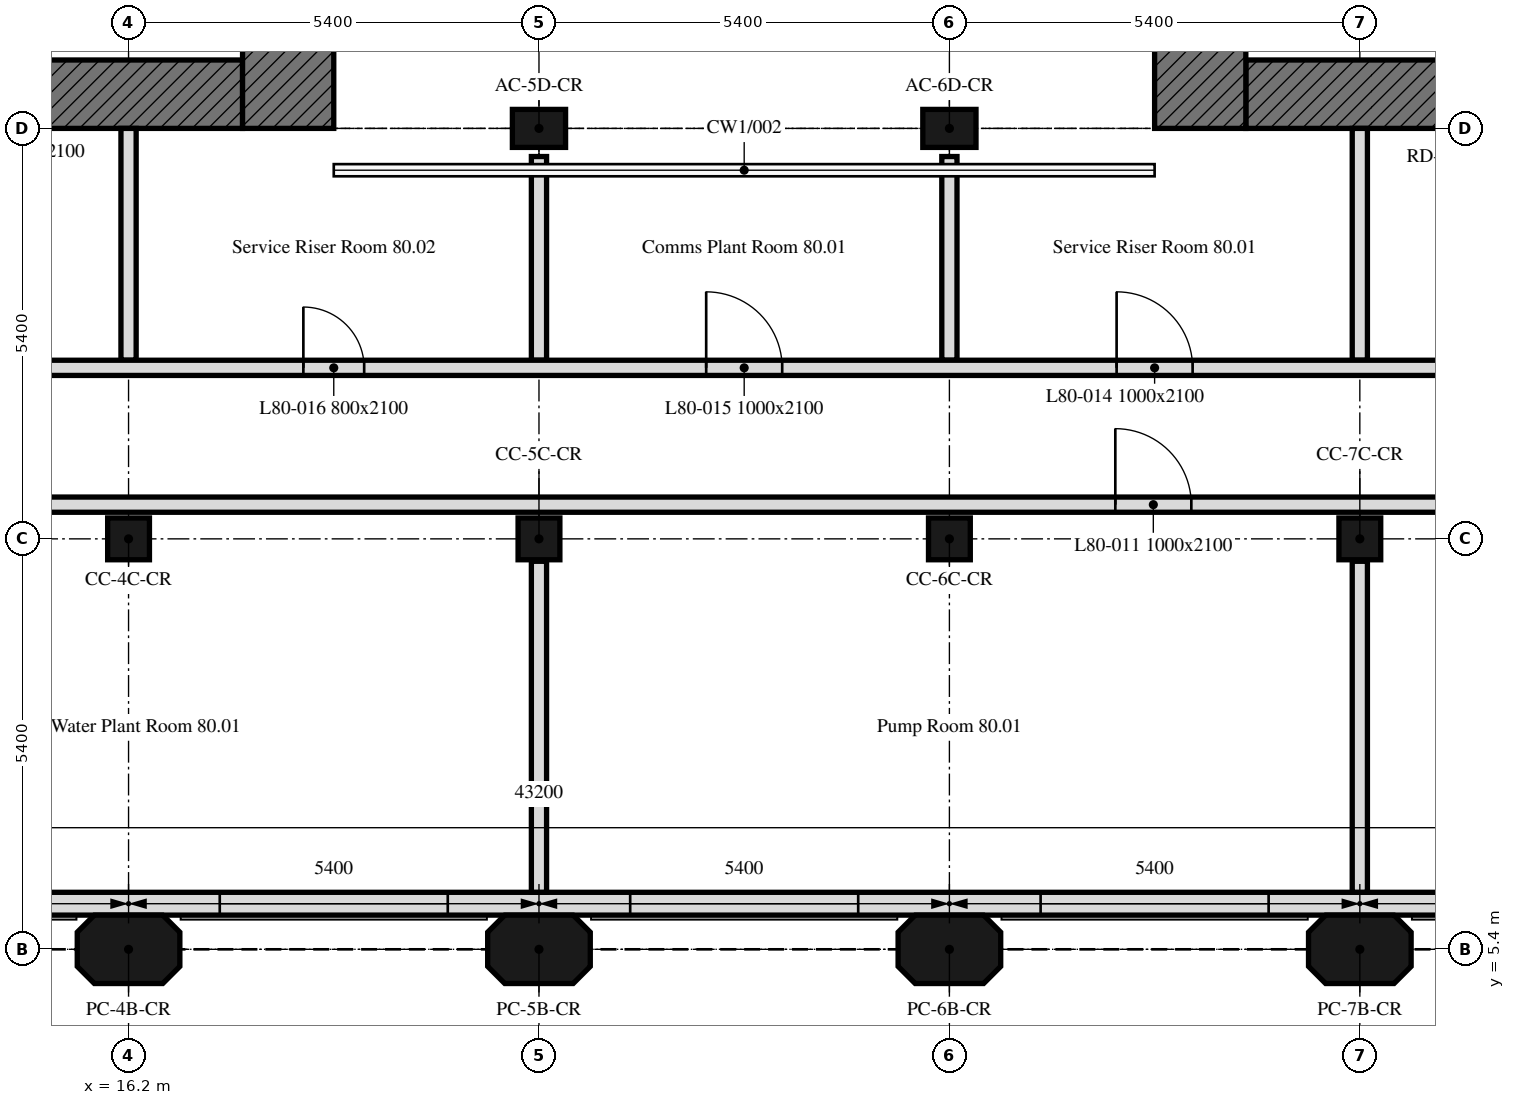
"""IFC4 building model, lengths in metres.
Left out: names, types, materials, properties, quantities, classifications, styles, units other than length and angle.
Written with IfcOpenShell. Run it as: python <this file> out.ifc"""

import sys

from ifc_helpers import new_model, si_unit, direction, frame, frame_2d, origin, origin_2d, place, context, subcontext, project, spatial, polyline, rectangle, outline, extrude, element, fill, save


model = new_model("IFC4")
c1 = context("Model", 3, precision=1e-05, world=origin(), true_north=direction((0.0, 1.0)))
c2 = subcontext(c1, "Body", "Model", "MODEL_VIEW")
j1 = project(units=[si_unit("LENGTHUNIT", "METRE"), si_unit("PLANEANGLEUNIT", "RADIAN")], contexts=[c1])
p1 = place(None, origin())
s1 = spatial("IfcSite", under=j1, at=p1, CompositionType="ELEMENT")
p2 = place(p1, origin())
s2 = spatial("IfcBuilding", under=s1, at=p2, CompositionType="ELEMENT")
p3 = place(p2, frame((0.0, 0.0, 321.7)))
s3 = spatial("IfcBuildingStorey", under=s2, at=p3, CompositionType="ELEMENT", Elevation=321.7)
for number, where, z_axis, x_axis in (
    (1, (16.2, 5.4, 0.0), (0.0, 0.0, 1.0), (1.0, 0.0, 0.0)),
    (2, (21.6, 5.4, 0.0), (0.0, 0.0, 1.0), (1.0, 0.0, 0.0)),
    (3, (27.0, 5.4, 0.0), (0.0, 0.0, 1.0), (1.0, 0.0, 0.0)),
    (4, (32.4, 5.4, 0.0), (0.0, 0.0, 1.0), (1.0, 0.0, 0.0)),
):
    element("IfcColumn", number, at=place(p3, frame(where, z_axis=z_axis, x_axis=x_axis)), inside=s3, PredefinedType="COLUMN", context=c2, shape_type="SweptSolid", body=[
        extrude(outline(polyline([(-0.45, -0.45), (0.45, -0.45), (0.675, -0.225), (0.675, 0.225), (0.45, 0.45), (-0.45, 0.45), (-0.675, 0.225), (-0.675, -0.225), (-0.45, -0.45)])), origin(), (0.0, 0.0, 1.0), 4.2),
    ])
for number, where, z_axis, x_axis in (
    (5, (16.2, 10.8, 0.0), (0.0, 0.0, 1.0), (1.0, 0.0, 0.0)),
    (6, (21.6, 10.8, 0.0), (0.0, 0.0, 1.0), (1.0, 0.0, 0.0)),
    (7, (27.0, 10.8, 0.0), (0.0, 0.0, 1.0), (1.0, 0.0, 0.0)),
    (8, (32.4, 10.8, 0.0), (0.0, 0.0, 1.0), (1.0, 0.0, 0.0)),
):
    element("IfcColumn", number, at=place(p3, frame(where, z_axis=z_axis, x_axis=x_axis)), inside=s3, PredefinedType="COLUMN", context=c2, shape_type="SweptSolid", body=[
        extrude(rectangle(XDim=0.55, YDim=0.55, at=origin_2d()), origin(), (0.0, 0.0, 1.0), 4.2),
    ])
for number, where, z_axis, x_axis in (
    (9, (21.6, 16.2, 0.0), (0.0, 0.0, 1.0), (1.0, 0.0, 0.0)),
    (10, (27.0, 16.2, 0.0), (0.0, 0.0, 1.0), (1.0, 0.0, 0.0)),
):
    element("IfcColumn", number, at=place(p3, frame(where, z_axis=z_axis, x_axis=x_axis)), inside=s3, PredefinedType="COLUMN", context=c2, shape_type="SweptSolid", body=[
        extrude(rectangle(XDim=0.7, YDim=0.5, at=origin_2d()), origin(), (0.0, 0.0, 1.0), 4.2),
    ])
p4 = place(p3, frame((9.45, 6.0, 0.0), z_axis=(0.0, 0.0, 1.0), x_axis=(1.0, 0.0, 0.0)))
e11 = element("IfcWall", 11, at=p4, inside=s3, PredefinedType="SOLIDWALL", context=c2, shape_type="SweptSolid", body=[
    extrude(outline(polyline([(0.0, 0.0), (28.164, 0.0), (28.164, 4.2), (27.564, 4.2), (26.965, 4.2), (26.366, 4.2), (25.767, 4.2), (25.167, 4.2), (24.568, 4.2), (23.969, 4.2), (23.37, 4.2), (22.771, 4.2), (22.171, 4.2), (21.572, 4.2), (20.973, 4.2), (20.374, 4.2), (19.774, 4.2), (19.175, 4.2), (18.576, 4.2), (17.977, 4.2), (17.377, 4.2), (16.778, 4.2), (16.179, 4.2), (15.58, 4.2), (14.981, 4.2), (14.381, 4.2), (13.782, 4.2), (13.183, 4.2), (12.584, 4.2), (11.985, 4.2), (11.385, 4.2), (10.786, 4.2), (10.187, 4.2), (9.588, 4.2), (8.988, 4.2), (8.389, 4.2), (7.79, 4.2), (7.191, 4.2), (6.592, 4.2), (5.992, 4.2), (5.393, 4.2), (4.794, 4.2), (4.195, 4.2), (3.595, 4.2), (2.996, 4.2), (2.397, 4.2), (1.798, 4.2), (1.198, 4.2), (0.599, 4.2), (0.0, 4.2), (0.0, 0.0)])), frame((0.0, 0.15, 0.0), z_axis=(0.0, -1.0, 0.0), x_axis=(1.0, 0.0, 0.0)), (0.0, 0.0, 1.0), 0.3),
])
p5 = place(p4, frame((2.55, 0.0, 0.6)))
e12 = element("IfcOpeningElement", 12, at=p5, cuts=e11, PredefinedType="OPENING", context=c2, shape_type="SweptSolid", body=[
    extrude(rectangle(XDim=3.0, YDim=1.8, at=frame_2d((1.5, 0.9))), frame((0.0, 0.16, 0.0), z_axis=(0.0, -1.0, 0.0), x_axis=(1.0, 0.0, 0.0)), (0.0, 0.0, 1.0), 0.32),
])
p6 = place(p4, frame((7.95, 0.0, 0.6)))
e13 = element("IfcOpeningElement", 13, at=p6, cuts=e11, PredefinedType="OPENING", context=c2, shape_type="SweptSolid", body=[
    extrude(rectangle(XDim=3.0, YDim=1.8, at=frame_2d((1.5, 0.9))), frame((0.0, 0.16, 0.0), z_axis=(0.0, -1.0, 0.0), x_axis=(1.0, 0.0, 0.0)), (0.0, 0.0, 1.0), 0.32),
])
p7 = place(p4, frame((13.35, 0.0, 0.6)))
e14 = element("IfcOpeningElement", 14, at=p7, cuts=e11, PredefinedType="OPENING", context=c2, shape_type="SweptSolid", body=[
    extrude(rectangle(XDim=3.0, YDim=1.8, at=frame_2d((1.5, 0.9))), frame((0.0, 0.16, 0.0), z_axis=(0.0, -1.0, 0.0), x_axis=(1.0, 0.0, 0.0)), (0.0, 0.0, 1.0), 0.32),
])
p8 = place(p4, frame((18.75, 0.0, 0.6)))
e15 = element("IfcOpeningElement", 15, at=p8, cuts=e11, PredefinedType="OPENING", context=c2, shape_type="SweptSolid", body=[
    extrude(rectangle(XDim=3.0, YDim=1.8, at=frame_2d((1.5, 0.9))), frame((0.0, 0.16, 0.0), z_axis=(0.0, -1.0, 0.0), x_axis=(1.0, 0.0, 0.0)), (0.0, 0.0, 1.0), 0.32),
])
p9 = place(p4, frame((24.15, 0.0, 0.6)))
e16 = element("IfcOpeningElement", 16, at=p9, cuts=e11, PredefinedType="OPENING", context=c2, shape_type="SweptSolid", body=[
    extrude(rectangle(XDim=3.0, YDim=1.8, at=frame_2d((1.5, 0.9))), frame((0.0, 0.16, 0.0), z_axis=(0.0, -1.0, 0.0), x_axis=(1.0, 0.0, 0.0)), (0.0, 0.0, 1.0), 0.32),
])
p10 = place(p3, frame((17.7, 16.65, 0.0), z_axis=(0.0, 0.0, 1.0), x_axis=(-1.0, 0.0, 0.0)))
e17 = element("IfcWall", 17, at=p10, inside=s3, PredefinedType="SOLIDWALL", context=c2, shape_type="SweptSolid", body=[
    extrude(outline(polyline([(0.0, 0.0), (11.1, 0.0), (11.1, 5.933), (0.0, 4.2), (0.0, 0.0)])), frame((0.0, 0.45, 0.0), z_axis=(0.0, -1.0, 0.0), x_axis=(1.0, 0.0, 0.0)), (0.0, 0.0, 1.0), 0.9),
])
p11 = place(p10, frame((5.55, 0.0, 0.0)))
e18 = element("IfcOpeningElement", 18, at=p11, cuts=e17, PredefinedType="OPENING", context=c2, shape_type="SweptSolid", body=[
    extrude(rectangle(XDim=2.0, YDim=2.4, at=frame_2d((1.0, 1.2))), frame((0.0, 0.45, 0.0), z_axis=(0.0, -1.0, 0.0), x_axis=(1.0, 0.0, 0.0)), (0.0, 0.0, 1.0), 0.9),
])
p12 = place(p3, frame((18.3, 32.4, 0.0), z_axis=(0.0, 0.0, 1.0), x_axis=(0.0, -1.0, 0.0)))
e19 = element("IfcWall", 19, at=p12, inside=s3, PredefinedType="SOLIDWALL", context=c2, shape_type="SweptSolid", body=[
    extrude(rectangle(XDim=16.2, YDim=1.2, at=frame_2d((8.1, 0.0))), origin(), (0.0, 0.0, 1.0), 4.2),
])
p13 = place(p3, frame((42.0, 16.65, 0.0), z_axis=(0.0, 0.0, 1.0), x_axis=(-1.0, 0.0, 0.0)))
e20 = element("IfcWall", 20, at=p13, inside=s3, PredefinedType="SOLIDWALL", context=c2, shape_type="SweptSolid", body=[
    extrude(rectangle(XDim=11.1, YDim=0.9, at=frame_2d((5.55, 0.0))), origin(), (0.0, 0.0, 1.0), 4.2),
])
p14 = place(p13, frame((3.55, 0.0, 0.0)))
e21 = element("IfcOpeningElement", 21, at=p14, cuts=e20, PredefinedType="OPENING", context=c2, shape_type="SweptSolid", body=[
    extrude(rectangle(XDim=2.0, YDim=2.4, at=frame_2d((1.0, 1.2))), frame((0.0, 0.45, 0.0), z_axis=(0.0, -1.0, 0.0), x_axis=(1.0, 0.0, 0.0)), (0.0, 0.0, 1.0), 0.9),
])
p15 = place(p3, frame((30.3, 16.2, 0.0), z_axis=(0.0, 0.0, 1.0), x_axis=(0.0, 1.0, 0.0)))
e22 = element("IfcWall", 22, at=p15, inside=s3, PredefinedType="SOLIDWALL", context=c2, shape_type="SweptSolid", body=[
    extrude(rectangle(XDim=16.2, YDim=1.2, at=frame_2d((8.1, 0.0))), origin(), (0.0, 0.0, 1.0), 4.2),
])
for number, where, z_axis, x_axis in (
    (23, (32.4, 10.505, 0.0), (0.0, 0.0, 1.0), (0.0, -1.0, 0.0)),
    (24, (21.6, 10.505, 0.0), (0.0, 0.0, 1.0), (0.0, -1.0, 0.0)),
):
    element("IfcWall", number, at=place(p3, frame(where, z_axis=z_axis, x_axis=x_axis)), inside=s3, PredefinedType="PARTITIONING", context=c2, shape_type="SweptSolid", body=[
        extrude(rectangle(XDim=4.354, YDim=0.2, at=frame_2d((2.177, 0.0))), origin(), (0.0, 0.0, 1.0), 4.2),
    ])
p16 = place(p3, frame((9.45, 11.25, 0.0), z_axis=(0.0, 0.0, 1.0), x_axis=(1.0, 0.0, 0.0)))
e25 = element("IfcWall", 25, at=p16, inside=s3, PredefinedType="PARTITIONING", context=c2, shape_type="SweptSolid", body=[
    extrude(rectangle(XDim=32.999, YDim=0.2, at=frame_2d((16.5, 0.0))), origin(), (0.0, 0.0, 1.0), 4.2),
])
p17 = place(p16, frame((25.167, 0.0, 0.0)))
e26 = element("IfcOpeningElement", 26, at=p17, cuts=e25, PredefinedType="OPENING", context=c2, shape_type="SweptSolid", body=[
    extrude(rectangle(XDim=1.0, YDim=2.1, at=frame_2d((0.5, 1.05))), frame((0.0, 0.1, 0.0), z_axis=(0.0, -1.0, 0.0), x_axis=(1.0, 0.0, 0.0)), (0.0, 0.0, 1.0), 0.2),
])
p18 = place(p16, frame((19.733, 0.0, 0.0)))
e27 = element("IfcOpeningElement", 27, at=p18, cuts=e25, PredefinedType="OPENING", context=c2, shape_type="SweptSolid", body=[
    extrude(rectangle(XDim=1.0, YDim=2.1, at=frame_2d((0.5, 1.05))), frame((0.0, 0.1, 0.0), z_axis=(0.0, -1.0, 0.0), x_axis=(1.0, 0.0, 0.0)), (0.0, 0.0, 1.0), 0.2),
])
p19 = place(p16, frame((3.567, 0.0, 0.0)))
e28 = element("IfcOpeningElement", 28, at=p19, cuts=e25, PredefinedType="OPENING", context=c2, shape_type="SweptSolid", body=[
    extrude(rectangle(XDim=1.0, YDim=2.1, at=frame_2d((0.5, 1.05))), frame((0.0, 0.1, 0.0), z_axis=(0.0, -1.0, 0.0), x_axis=(1.0, 0.0, 0.0)), (0.0, 0.0, 1.0), 0.2),
])
p20 = place(p3, frame((27.0, 15.83, 0.0), z_axis=(0.0, 0.0, 1.0), x_axis=(0.0, -1.0, 0.0)))
e29 = element("IfcWall", 29, at=p20, inside=s3, PredefinedType="PARTITIONING", context=c2, shape_type="SweptSolid", body=[
    extrude(rectangle(XDim=2.68, YDim=0.2, at=frame_2d((1.34, 0.0))), origin(), (0.0, 0.0, 1.0), 4.2),
])
p21 = place(p3, frame((32.4, 13.15, 0.0), z_axis=(0.0, 0.0, 1.0), x_axis=(0.0, 1.0, 0.0)))
e30 = element("IfcWall", 30, at=p21, inside=s3, PredefinedType="PARTITIONING", context=c2, shape_type="SweptSolid", body=[
    extrude(rectangle(XDim=3.05, YDim=0.2, at=frame_2d((1.525, 0.0))), origin(), (0.0, 0.0, 1.0), 4.2),
])
p22 = place(p3, frame((21.6, 15.83, 0.0), z_axis=(0.0, 0.0, 1.0), x_axis=(0.0, -1.0, 0.0)))
e31 = element("IfcWall", 31, at=p22, inside=s3, PredefinedType="PARTITIONING", context=c2, shape_type="SweptSolid", body=[
    extrude(rectangle(XDim=2.68, YDim=0.2, at=frame_2d((1.34, 0.0))), origin(), (0.0, 0.0, 1.0), 4.2),
])
p23 = place(p3, frame((16.2, 16.2, 0.0), z_axis=(0.0, 0.0, 1.0), x_axis=(0.0, -1.0, 0.0)))
e32 = element("IfcWall", 32, at=p23, inside=s3, PredefinedType="PARTITIONING", context=c2, shape_type="SweptSolid", body=[
    extrude(rectangle(XDim=3.05, YDim=0.2, at=frame_2d((1.525, 0.0))), origin(), (0.0, 0.0, 1.0), 4.2),
])
p24 = place(p3, frame((9.45, 13.05, 0.0), z_axis=(0.0, 0.0, 1.0), x_axis=(1.0, 0.0, 0.0)))
e33 = element("IfcWall", 33, at=p24, inside=s3, PredefinedType="PARTITIONING", context=c2, shape_type="SweptSolid", body=[
    extrude(rectangle(XDim=31.899, YDim=0.2, at=frame_2d((15.95, 0.0))), origin(), (0.0, 0.0, 1.0), 4.2),
])
p25 = place(p24, frame((19.75, 0.0, 0.0)))
e34 = element("IfcOpeningElement", 34, at=p25, cuts=e33, PredefinedType="OPENING", context=c2, shape_type="SweptSolid", body=[
    extrude(rectangle(XDim=1.0, YDim=2.1, at=frame_2d((0.5, 1.05))), frame((0.0, 0.1, 0.0), z_axis=(0.0, -1.0, 0.0), x_axis=(1.0, 0.0, 0.0)), (0.0, 0.0, 1.0), 0.2),
])
p26 = place(p24, frame((14.35, 0.0, 0.0)))
e35 = element("IfcOpeningElement", 35, at=p26, cuts=e33, PredefinedType="OPENING", context=c2, shape_type="SweptSolid", body=[
    extrude(rectangle(XDim=1.0, YDim=2.1, at=frame_2d((0.5, 1.05))), frame((0.0, 0.1, 0.0), z_axis=(0.0, -1.0, 0.0), x_axis=(1.0, 0.0, 0.0)), (0.0, 0.0, 1.0), 0.2),
])
p27 = place(p24, frame((9.05, 0.0, 0.0)))
e36 = element("IfcOpeningElement", 36, at=p27, cuts=e33, PredefinedType="OPENING", context=c2, shape_type="SweptSolid", body=[
    extrude(rectangle(XDim=0.8, YDim=2.1, at=frame_2d((0.4, 1.05))), frame((0.0, 0.1, 0.0), z_axis=(0.0, -1.0, 0.0), x_axis=(1.0, 0.0, 0.0)), (0.0, 0.0, 1.0), 0.2),
])
p28 = place(p24, frame((25.35, 0.0, 0.0)))
e37 = element("IfcOpeningElement", 37, at=p28, cuts=e33, PredefinedType="OPENING", context=c2, shape_type="SweptSolid", body=[
    extrude(rectangle(XDim=1.8, YDim=2.4, at=frame_2d((0.9, 1.2))), frame((0.0, 0.1, 0.0), z_axis=(0.0, -1.0, 0.0), x_axis=(1.0, 0.0, 0.0)), (0.0, 0.0, 1.0), 0.2),
])
p29 = place(p6, origin())
e38 = element("IfcWindow", 38, at=p29, inside=s3, PartitioningType="SINGLE_PANEL", PredefinedType="WINDOW", context=c2, shape_type="SweptSolid", body=[
    extrude(rectangle(XDim=3.0, YDim=1.8, at=frame_2d((1.5, 0.9))), frame((0.0, 0.03, 0.0), z_axis=(0.0, -1.0, 0.0), x_axis=(1.0, 0.0, 0.0)), (0.0, 0.0, 1.0), 0.06),
])
fill(e13, e38)
p30 = place(p7, origin())
e39 = element("IfcWindow", 39, at=p30, inside=s3, PartitioningType="SINGLE_PANEL", PredefinedType="WINDOW", context=c2, shape_type="SweptSolid", body=[
    extrude(rectangle(XDim=3.0, YDim=1.8, at=frame_2d((1.5, 0.9))), frame((0.0, 0.03, 0.0), z_axis=(0.0, -1.0, 0.0), x_axis=(1.0, 0.0, 0.0)), (0.0, 0.0, 1.0), 0.06),
])
fill(e14, e39)
p31 = place(p8, origin())
e40 = element("IfcWindow", 40, at=p31, inside=s3, PartitioningType="SINGLE_PANEL", PredefinedType="WINDOW", context=c2, shape_type="SweptSolid", body=[
    extrude(rectangle(XDim=3.0, YDim=1.8, at=frame_2d((1.5, 0.9))), frame((0.0, 0.03, 0.0), z_axis=(0.0, -1.0, 0.0), x_axis=(1.0, 0.0, 0.0)), (0.0, 0.0, 1.0), 0.06),
])
fill(e15, e40)
p32 = place(p18, origin())
e41 = element("IfcDoor", 41, at=p32, inside=s3, OperationType="SINGLE_SWING_LEFT", PredefinedType="DOOR", context=c2, shape_type="SweptSolid", body=[
    extrude(rectangle(XDim=1.0, YDim=2.1, at=frame_2d((0.5, 1.05))), frame((0.0, 0.025, 0.0), z_axis=(0.0, -1.0, 0.0), x_axis=(1.0, 0.0, 0.0)), (0.0, 0.0, 1.0), 0.05),
])
fill(e27, e41)
p33 = place(p25, origin())
e42 = element("IfcDoor", 42, at=p33, inside=s3, OperationType="SINGLE_SWING_RIGHT", PredefinedType="DOOR", context=c2, shape_type="SweptSolid", body=[
    extrude(rectangle(XDim=1.0, YDim=2.1, at=frame_2d((0.5, 1.05))), frame((0.0, 0.025, 0.0), z_axis=(0.0, -1.0, 0.0), x_axis=(1.0, 0.0, 0.0)), (0.0, 0.0, 1.0), 0.05),
])
fill(e34, e42)
p34 = place(p26, origin())
e43 = element("IfcDoor", 43, at=p34, inside=s3, OperationType="SINGLE_SWING_LEFT", PredefinedType="DOOR", context=c2, shape_type="SweptSolid", body=[
    extrude(rectangle(XDim=1.0, YDim=2.1, at=frame_2d((0.5, 1.05))), frame((0.0, 0.025, 0.0), z_axis=(0.0, -1.0, 0.0), x_axis=(1.0, 0.0, 0.0)), (0.0, 0.0, 1.0), 0.05),
])
fill(e35, e43)
p35 = place(p27, origin())
e44 = element("IfcDoor", 44, at=p35, inside=s3, OperationType="SINGLE_SWING_LEFT", PredefinedType="DOOR", context=c2, shape_type="SweptSolid", body=[
    extrude(rectangle(XDim=0.8, YDim=2.1, at=frame_2d((0.4, 1.05))), frame((0.0, 0.025, 0.0), z_axis=(0.0, -1.0, 0.0), x_axis=(1.0, 0.0, 0.0)), (0.0, 0.0, 1.0), 0.05),
])
fill(e36, e44)
save(model, sys.argv[1])
